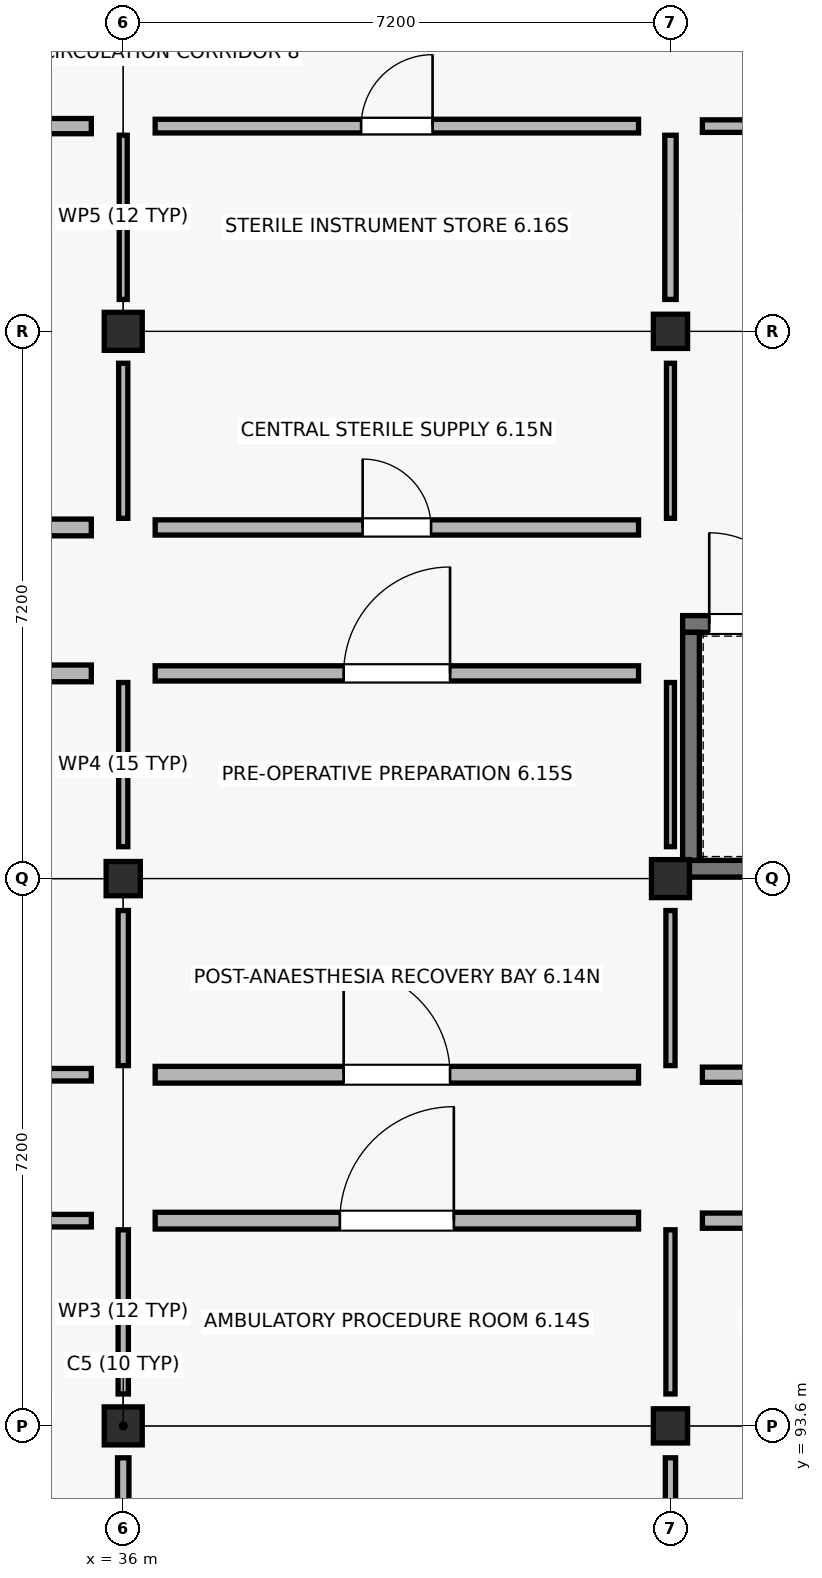
"""IFC4 building model, lengths in metres.
Left out: names, types, materials, properties, quantities, classifications, styles, units other than length and angle.
Written with IfcOpenShell. Run it as: python <this file> out.ifc"""

import sys

from ifc_helpers import new_model, si_unit, direction, frame, frame_2d, origin, origin_2d, place, context, subcontext, project, spatial, rectangle, extrude, element, fill, save


model = new_model("IFC4")
c1 = context("Model", 3, precision=1e-05, world=origin(), true_north=direction((0.0, 1.0)))
c2 = subcontext(c1, "Body", "Model", "MODEL_VIEW")
j1 = project(units=[si_unit("LENGTHUNIT", "METRE"), si_unit("PLANEANGLEUNIT", "RADIAN")], contexts=[c1])
p1 = place(None, origin())
s1 = spatial("IfcSite", under=j1, at=p1, CompositionType="ELEMENT")
p2 = place(p1, origin())
s2 = spatial("IfcBuilding", under=s1, at=p2, CompositionType="ELEMENT")
p3 = place(p2, frame((0.0, 0.0, 9.0)))
s3 = spatial("IfcBuildingStorey", under=s2, at=p3, CompositionType="ELEMENT", Elevation=9.0)
p4 = place(p3, frame((36.0, 93.6, 0.0), z_axis=(0.0, 0.0, 1.0), x_axis=(1.0, 0.0, 0.0)))
e1 = element("IfcColumn", 1, at=p4, inside=s3, PredefinedType="COLUMN", context=c2, shape_type="SweptSolid", body=[
    extrude(rectangle(XDim=0.5, YDim=0.5, at=origin_2d()), origin(), (0.0, 0.0, 1.0), 4.28),
])
p5 = place(p3, frame((36.0, 100.8, 0.0), z_axis=(0.0, 0.0, 1.0), x_axis=(1.0, 0.0, 0.0)))
e2 = element("IfcColumn", 2, at=p5, inside=s3, PredefinedType="COLUMN", context=c2, shape_type="SweptSolid", body=[
    extrude(rectangle(XDim=0.45, YDim=0.45, at=origin_2d()), origin(), (0.0, 0.0, 1.0), 4.28),
])
p6 = place(p3, frame((36.0, 108.0, 0.0), z_axis=(0.0, 0.0, 1.0), x_axis=(1.0, 0.0, 0.0)))
e3 = element("IfcColumn", 3, at=p6, inside=s3, PredefinedType="COLUMN", context=c2, shape_type="SweptSolid", body=[
    extrude(rectangle(XDim=0.5, YDim=0.5, at=origin_2d()), origin(), (0.0, 0.0, 1.0), 4.28),
])
p7 = place(p3, frame((43.2, 93.6, 0.0), z_axis=(0.0, 0.0, 1.0), x_axis=(1.0, 0.0, 0.0)))
e4 = element("IfcColumn", 4, at=p7, inside=s3, PredefinedType="COLUMN", context=c2, shape_type="SweptSolid", body=[
    extrude(rectangle(XDim=0.45, YDim=0.45, at=origin_2d()), origin(), (0.0, 0.0, 1.0), 4.28),
])
p8 = place(p3, frame((43.2, 100.8, 0.0), z_axis=(0.0, 0.0, 1.0), x_axis=(1.0, 0.0, 0.0)))
e5 = element("IfcColumn", 5, at=p8, inside=s3, PredefinedType="COLUMN", context=c2, shape_type="SweptSolid", body=[
    extrude(rectangle(XDim=0.5, YDim=0.5, at=origin_2d()), origin(), (0.0, 0.0, 1.0), 4.28),
])
p9 = place(p3, frame((43.2, 108.0, 0.0), z_axis=(0.0, 0.0, 1.0), x_axis=(1.0, 0.0, 0.0)))
e6 = element("IfcColumn", 6, at=p9, inside=s3, PredefinedType="COLUMN", context=c2, shape_type="SweptSolid", body=[
    extrude(rectangle(XDim=0.45, YDim=0.45, at=origin_2d()), origin(), (0.0, 0.0, 1.0), 4.28),
])
p10 = place(p3, frame((43.36, 100.93, 0.0), z_axis=(0.0, 0.0, 1.0), x_axis=(1.0, 0.0, 0.0)))
e7 = element("IfcWall", 7, at=p10, inside=s3, PredefinedType="SHEAR", context=c2, shape_type="SweptSolid", body=[
    extrude(rectangle(XDim=6.88, YDim=0.22, at=frame_2d((3.44, 0.0))), origin(), (0.0, 0.0, 1.0), 4.24),
])
p11 = place(p3, frame((43.36, 104.15, 0.0), z_axis=(0.0, 0.0, 1.0), x_axis=(1.0, 0.0, 0.0)))
e8 = element("IfcWall", 8, at=p11, inside=s3, PredefinedType="SHEAR", context=c2, shape_type="SweptSolid", body=[
    extrude(rectangle(XDim=6.88, YDim=0.22, at=frame_2d((3.44, 0.0))), origin(), (0.0, 0.0, 1.0), 4.24),
])
p12 = place(p11, frame((0.35, 0.0, 0.0)))
e9 = element("IfcOpeningElement", 9, at=p12, cuts=e8, PredefinedType="OPENING", context=c2, shape_type="SweptSolid", body=[
    extrude(rectangle(XDim=1.2, YDim=2.15, at=frame_2d((0.6, 1.075))), frame((0.0, 0.12, 0.0), z_axis=(0.0, -1.0, 0.0), x_axis=(1.0, 0.0, 0.0)), (0.0, 0.0, 1.0), 0.24),
])
p13 = place(p3, frame((43.47, 101.04, 0.0), z_axis=(0.0, 0.0, 1.0), x_axis=(0.0, 1.0, 0.0)))
e10 = element("IfcWall", 10, at=p13, inside=s3, PredefinedType="SHEAR", context=c2, shape_type="SweptSolid", body=[
    extrude(rectangle(XDim=3.0, YDim=0.22, at=frame_2d((1.5, 0.0))), origin(), (0.0, 0.0, 1.0), 4.24),
])
p14 = place(p3, frame((36.0, 91.14, 0.0), z_axis=(0.0, 0.0, 1.0), x_axis=(0.0, 1.0, 0.0)))
e11 = element("IfcWall", 11, at=p14, inside=s3, PredefinedType="PARTITIONING", context=c2, shape_type="SweptSolid", body=[
    extrude(rectangle(XDim=2.04, YDim=0.15, at=frame_2d((1.02, 0.0))), origin(), (0.0, 0.0, 1.0), 3.38),
])
p15 = place(p3, frame((29.22, 96.3, 0.0), z_axis=(0.0, 0.0, 1.0), x_axis=(1.0, 0.0, 0.0)))
e12 = element("IfcWall", 12, at=p15, inside=s3, PredefinedType="PARTITIONING", context=c2, shape_type="SweptSolid", body=[
    extrude(rectangle(XDim=6.36, YDim=0.165, at=frame_2d((3.18, 0.0))), origin(), (0.0, 0.0, 1.0), 3.38),
])
p16 = place(p15, frame((2.48, 0.0, 0.0)))
e13 = element("IfcOpeningElement", 13, at=p16, cuts=e12, PredefinedType="OPENING", context=c2, shape_type="SweptSolid", body=[
    extrude(rectangle(XDim=1.4, YDim=2.2, at=frame_2d((0.7, 1.1))), frame((0.0, 0.093, 0.0), z_axis=(0.0, -1.0, 0.0), x_axis=(1.0, 0.0, 0.0)), (0.0, 0.0, 1.0), 0.185),
])
p17 = place(p3, frame((36.0, 94.02, 0.0), z_axis=(0.0, 0.0, 1.0), x_axis=(0.0, 1.0, 0.0)))
e14 = element("IfcWall", 14, at=p17, inside=s3, PredefinedType="PARTITIONING", context=c2, shape_type="SweptSolid", body=[
    extrude(rectangle(XDim=2.16, YDim=0.135, at=frame_2d((1.08, 0.0))), origin(), (0.0, 0.0, 1.0), 3.38),
])
p18 = place(p3, frame((29.22, 98.22, 0.0), z_axis=(0.0, 0.0, 1.0), x_axis=(1.0, 0.0, 0.0)))
e15 = element("IfcWall", 15, at=p18, inside=s3, PredefinedType="PARTITIONING", context=c2, shape_type="SweptSolid", body=[
    extrude(rectangle(XDim=6.36, YDim=0.165, at=frame_2d((3.18, 0.0))), origin(), (0.0, 0.0, 1.0), 3.38),
])
p19 = place(p18, frame((2.48, 0.0, 0.0)))
e16 = element("IfcOpeningElement", 16, at=p19, cuts=e15, PredefinedType="OPENING", context=c2, shape_type="SweptSolid", body=[
    extrude(rectangle(XDim=1.4, YDim=2.2, at=frame_2d((0.7, 1.1))), frame((0.0, 0.093, 0.0), z_axis=(0.0, -1.0, 0.0), x_axis=(1.0, 0.0, 0.0)), (0.0, 0.0, 1.0), 0.185),
])
p20 = place(p3, frame((36.0, 98.34, 0.0), z_axis=(0.0, 0.0, 1.0), x_axis=(0.0, 1.0, 0.0)))
e17 = element("IfcWall", 17, at=p20, inside=s3, PredefinedType="PARTITIONING", context=c2, shape_type="SweptSolid", body=[
    extrude(rectangle(XDim=2.04, YDim=0.135, at=frame_2d((1.02, 0.0))), origin(), (0.0, 0.0, 1.0), 3.38),
])
p21 = place(p3, frame((29.22, 103.5, 0.0), z_axis=(0.0, 0.0, 1.0), x_axis=(1.0, 0.0, 0.0)))
e18 = element("IfcWall", 18, at=p21, inside=s3, PredefinedType="SOLIDWALL", context=c2, shape_type="SweptSolid", body=[
    extrude(rectangle(XDim=6.36, YDim=0.22, at=frame_2d((3.18, 0.0))), origin(), (0.0, 0.0, 1.0), 3.38),
])
p22 = place(p21, frame((2.59, 0.0, 0.0)))
e19 = element("IfcOpeningElement", 19, at=p22, cuts=e18, PredefinedType="OPENING", context=c2, shape_type="SweptSolid", body=[
    extrude(rectangle(XDim=1.18, YDim=2.14, at=frame_2d((0.59, 1.07))), frame((0.0, 0.12, 0.0), z_axis=(0.0, -1.0, 0.0), x_axis=(1.0, 0.0, 0.0)), (0.0, 0.0, 1.0), 0.24),
])
p23 = place(p3, frame((36.0, 101.22, 0.0), z_axis=(0.0, 0.0, 1.0), x_axis=(0.0, 1.0, 0.0)))
e20 = element("IfcWall", 20, at=p23, inside=s3, PredefinedType="PARTITIONING", context=c2, shape_type="SweptSolid", body=[
    extrude(rectangle(XDim=2.16, YDim=0.12, at=frame_2d((1.08, 0.0))), origin(), (0.0, 0.0, 1.0), 3.38),
])
p24 = place(p3, frame((29.22, 105.42, 0.0), z_axis=(0.0, 0.0, 1.0), x_axis=(1.0, 0.0, 0.0)))
e21 = element("IfcWall", 21, at=p24, inside=s3, PredefinedType="SOLIDWALL", context=c2, shape_type="SweptSolid", body=[
    extrude(rectangle(XDim=6.36, YDim=0.22, at=frame_2d((3.18, 0.0))), origin(), (0.0, 0.0, 1.0), 3.38),
])
p25 = place(p24, frame((2.57, 0.0, 0.0)))
e22 = element("IfcOpeningElement", 22, at=p25, cuts=e21, PredefinedType="OPENING", context=c2, shape_type="SweptSolid", body=[
    extrude(rectangle(XDim=1.22, YDim=2.14, at=frame_2d((0.61, 1.07))), frame((0.0, 0.12, 0.0), z_axis=(0.0, -1.0, 0.0), x_axis=(1.0, 0.0, 0.0)), (0.0, 0.0, 1.0), 0.24),
])
p26 = place(p3, frame((36.0, 105.54, 0.0), z_axis=(0.0, 0.0, 1.0), x_axis=(0.0, 1.0, 0.0)))
e23 = element("IfcWall", 23, at=p26, inside=s3, PredefinedType="PARTITIONING", context=c2, shape_type="SweptSolid", body=[
    extrude(rectangle(XDim=2.04, YDim=0.12, at=frame_2d((1.02, 0.0))), origin(), (0.0, 0.0, 1.0), 3.38),
])
p27 = place(p3, frame((29.22, 110.7, 0.0), z_axis=(0.0, 0.0, 1.0), x_axis=(1.0, 0.0, 0.0)))
e24 = element("IfcWall", 24, at=p27, inside=s3, PredefinedType="SOLIDWALL", context=c2, shape_type="SweptSolid", body=[
    extrude(rectangle(XDim=6.36, YDim=0.2, at=frame_2d((3.18, 0.0))), origin(), (0.0, 0.0, 1.0), 3.38),
])
p28 = place(p27, frame((2.43, 0.0, 0.0)))
e25 = element("IfcOpeningElement", 25, at=p28, cuts=e24, PredefinedType="OPENING", context=c2, shape_type="SweptSolid", body=[
    extrude(rectangle(XDim=1.5, YDim=2.2, at=frame_2d((0.75, 1.1))), frame((0.0, 0.11, 0.0), z_axis=(0.0, -1.0, 0.0), x_axis=(1.0, 0.0, 0.0)), (0.0, 0.0, 1.0), 0.22),
])
p29 = place(p3, frame((36.0, 108.42, 0.0), z_axis=(0.0, 0.0, 1.0), x_axis=(0.0, 1.0, 0.0)))
e26 = element("IfcWall", 26, at=p29, inside=s3, PredefinedType="PARTITIONING", context=c2, shape_type="SweptSolid", body=[
    extrude(rectangle(XDim=2.16, YDim=0.105, at=frame_2d((1.08, 0.0))), origin(), (0.0, 0.0, 1.0), 3.38),
])
p30 = place(p3, frame((43.2, 91.14, 0.0), z_axis=(0.0, 0.0, 1.0), x_axis=(0.0, 1.0, 0.0)))
e27 = element("IfcWall", 27, at=p30, inside=s3, PredefinedType="PARTITIONING", context=c2, shape_type="SweptSolid", body=[
    extrude(rectangle(XDim=2.04, YDim=0.135, at=frame_2d((1.02, 0.0))), origin(), (0.0, 0.0, 1.0), 3.38),
])
p31 = place(p3, frame((36.42, 96.3, 0.0), z_axis=(0.0, 0.0, 1.0), x_axis=(1.0, 0.0, 0.0)))
e28 = element("IfcWall", 28, at=p31, inside=s3, PredefinedType="SOLIDWALL", context=c2, shape_type="SweptSolid", body=[
    extrude(rectangle(XDim=6.36, YDim=0.22, at=frame_2d((3.18, 0.0))), origin(), (0.0, 0.0, 1.0), 3.38),
])
p32 = place(p31, frame((2.43, 0.0, 0.0)))
e29 = element("IfcOpeningElement", 29, at=p32, cuts=e28, PredefinedType="OPENING", context=c2, shape_type="SweptSolid", body=[
    extrude(rectangle(XDim=1.5, YDim=2.2, at=frame_2d((0.75, 1.1))), frame((0.0, 0.12, 0.0), z_axis=(0.0, -1.0, 0.0), x_axis=(1.0, 0.0, 0.0)), (0.0, 0.0, 1.0), 0.24),
])
p33 = place(p3, frame((43.2, 94.02, 0.0), z_axis=(0.0, 0.0, 1.0), x_axis=(0.0, 1.0, 0.0)))
e30 = element("IfcWall", 30, at=p33, inside=s3, PredefinedType="PARTITIONING", context=c2, shape_type="SweptSolid", body=[
    extrude(rectangle(XDim=2.16, YDim=0.12, at=frame_2d((1.08, 0.0))), origin(), (0.0, 0.0, 1.0), 3.38),
])
p34 = place(p3, frame((36.42, 98.22, 0.0), z_axis=(0.0, 0.0, 1.0), x_axis=(1.0, 0.0, 0.0)))
e31 = element("IfcWall", 31, at=p34, inside=s3, PredefinedType="SOLIDWALL", context=c2, shape_type="SweptSolid", body=[
    extrude(rectangle(XDim=6.36, YDim=0.22, at=frame_2d((3.18, 0.0))), origin(), (0.0, 0.0, 1.0), 3.38),
])
p35 = place(p34, frame((2.48, 0.0, 0.0)))
e32 = element("IfcOpeningElement", 32, at=p35, cuts=e31, PredefinedType="OPENING", context=c2, shape_type="SweptSolid", body=[
    extrude(rectangle(XDim=1.4, YDim=2.2, at=frame_2d((0.7, 1.1))), frame((0.0, 0.12, 0.0), z_axis=(0.0, -1.0, 0.0), x_axis=(1.0, 0.0, 0.0)), (0.0, 0.0, 1.0), 0.24),
])
p36 = place(p3, frame((43.2, 98.34, 0.0), z_axis=(0.0, 0.0, 1.0), x_axis=(0.0, 1.0, 0.0)))
e33 = element("IfcWall", 33, at=p36, inside=s3, PredefinedType="PARTITIONING", context=c2, shape_type="SweptSolid", body=[
    extrude(rectangle(XDim=2.04, YDim=0.12, at=frame_2d((1.02, 0.0))), origin(), (0.0, 0.0, 1.0), 3.38),
])
p37 = place(p3, frame((36.42, 103.5, 0.0), z_axis=(0.0, 0.0, 1.0), x_axis=(1.0, 0.0, 0.0)))
e34 = element("IfcWall", 34, at=p37, inside=s3, PredefinedType="SOLIDWALL", context=c2, shape_type="SweptSolid", body=[
    extrude(rectangle(XDim=6.36, YDim=0.2, at=frame_2d((3.18, 0.0))), origin(), (0.0, 0.0, 1.0), 3.38),
])
p38 = place(p37, frame((2.48, 0.0, 0.0)))
e35 = element("IfcOpeningElement", 35, at=p38, cuts=e34, PredefinedType="OPENING", context=c2, shape_type="SweptSolid", body=[
    extrude(rectangle(XDim=1.4, YDim=2.2, at=frame_2d((0.7, 1.1))), frame((0.0, 0.11, 0.0), z_axis=(0.0, -1.0, 0.0), x_axis=(1.0, 0.0, 0.0)), (0.0, 0.0, 1.0), 0.22),
])
p39 = place(p3, frame((43.2, 101.22, 0.0), z_axis=(0.0, 0.0, 1.0), x_axis=(0.0, 1.0, 0.0)))
e36 = element("IfcWall", 36, at=p39, inside=s3, PredefinedType="PARTITIONING", context=c2, shape_type="SweptSolid", body=[
    extrude(rectangle(XDim=2.16, YDim=0.105, at=frame_2d((1.08, 0.0))), origin(), (0.0, 0.0, 1.0), 3.38),
])
p40 = place(p3, frame((36.42, 105.42, 0.0), z_axis=(0.0, 0.0, 1.0), x_axis=(1.0, 0.0, 0.0)))
e37 = element("IfcWall", 37, at=p40, inside=s3, PredefinedType="SOLIDWALL", context=c2, shape_type="SweptSolid", body=[
    extrude(rectangle(XDim=6.36, YDim=0.2, at=frame_2d((3.18, 0.0))), origin(), (0.0, 0.0, 1.0), 3.38),
])
p41 = place(p40, frame((2.73, 0.0, 0.0)))
e38 = element("IfcOpeningElement", 38, at=p41, cuts=e37, PredefinedType="OPENING", context=c2, shape_type="SweptSolid", body=[
    extrude(rectangle(XDim=0.9, YDim=2.19, at=frame_2d((0.45, 1.095))), frame((0.0, 0.11, 0.0), z_axis=(0.0, -1.0, 0.0), x_axis=(1.0, 0.0, 0.0)), (0.0, 0.0, 1.0), 0.22),
])
p42 = place(p3, frame((43.2, 105.54, 0.0), z_axis=(0.0, 0.0, 1.0), x_axis=(0.0, 1.0, 0.0)))
e39 = element("IfcWall", 39, at=p42, inside=s3, PredefinedType="PARTITIONING", context=c2, shape_type="SweptSolid", body=[
    extrude(rectangle(XDim=2.04, YDim=0.105, at=frame_2d((1.02, 0.0))), origin(), (0.0, 0.0, 1.0), 3.38),
])
p43 = place(p3, frame((36.42, 110.7, 0.0), z_axis=(0.0, 0.0, 1.0), x_axis=(1.0, 0.0, 0.0)))
e40 = element("IfcWall", 40, at=p43, inside=s3, PredefinedType="PARTITIONING", context=c2, shape_type="SweptSolid", body=[
    extrude(rectangle(XDim=6.36, YDim=0.18, at=frame_2d((3.18, 0.0))), origin(), (0.0, 0.0, 1.0), 3.38),
])
p44 = place(p43, frame((2.71, 0.0, 0.0)))
e41 = element("IfcOpeningElement", 41, at=p44, cuts=e40, PredefinedType="OPENING", context=c2, shape_type="SweptSolid", body=[
    extrude(rectangle(XDim=0.94, YDim=2.19, at=frame_2d((0.47, 1.095))), frame((0.0, 0.1, 0.0), z_axis=(0.0, -1.0, 0.0), x_axis=(1.0, 0.0, 0.0)), (0.0, 0.0, 1.0), 0.2),
])
p45 = place(p3, frame((43.2, 108.42, 0.0), z_axis=(0.0, 0.0, 1.0), x_axis=(0.0, 1.0, 0.0)))
e42 = element("IfcWall", 42, at=p45, inside=s3, PredefinedType="PARTITIONING", context=c2, shape_type="SweptSolid", body=[
    extrude(rectangle(XDim=2.16, YDim=0.15, at=frame_2d((1.08, 0.0))), origin(), (0.0, 0.0, 1.0), 3.38),
])
p46 = place(p3, frame((43.62, 96.3, 0.0), z_axis=(0.0, 0.0, 1.0), x_axis=(1.0, 0.0, 0.0)))
e43 = element("IfcWall", 43, at=p46, inside=s3, PredefinedType="SOLIDWALL", context=c2, shape_type="SweptSolid", body=[
    extrude(rectangle(XDim=6.36, YDim=0.2, at=frame_2d((3.18, 0.0))), origin(), (0.0, 0.0, 1.0), 3.38),
])
p47 = place(p46, frame((2.43, 0.0, 0.0)))
e44 = element("IfcOpeningElement", 44, at=p47, cuts=e43, PredefinedType="OPENING", context=c2, shape_type="SweptSolid", body=[
    extrude(rectangle(XDim=1.5, YDim=2.2, at=frame_2d((0.75, 1.1))), frame((0.0, 0.11, 0.0), z_axis=(0.0, -1.0, 0.0), x_axis=(1.0, 0.0, 0.0)), (0.0, 0.0, 1.0), 0.22),
])
p48 = place(p3, frame((43.62, 98.22, 0.0), z_axis=(0.0, 0.0, 1.0), x_axis=(1.0, 0.0, 0.0)))
e45 = element("IfcWall", 45, at=p48, inside=s3, PredefinedType="SOLIDWALL", context=c2, shape_type="SweptSolid", body=[
    extrude(rectangle(XDim=6.36, YDim=0.2, at=frame_2d((3.18, 0.0))), origin(), (0.0, 0.0, 1.0), 3.38),
])
p49 = place(p48, frame((2.43, 0.0, 0.0)))
e46 = element("IfcOpeningElement", 46, at=p49, cuts=e45, PredefinedType="OPENING", context=c2, shape_type="SweptSolid", body=[
    extrude(rectangle(XDim=1.5, YDim=2.2, at=frame_2d((0.75, 1.1))), frame((0.0, 0.11, 0.0), z_axis=(0.0, -1.0, 0.0), x_axis=(1.0, 0.0, 0.0)), (0.0, 0.0, 1.0), 0.22),
])
p50 = place(p3, frame((43.62, 110.7, 0.0), z_axis=(0.0, 0.0, 1.0), x_axis=(1.0, 0.0, 0.0)))
e47 = element("IfcWall", 47, at=p50, inside=s3, PredefinedType="PARTITIONING", context=c2, shape_type="SweptSolid", body=[
    extrude(rectangle(XDim=6.36, YDim=0.165, at=frame_2d((3.18, 0.0))), origin(), (0.0, 0.0, 1.0), 3.38),
])
p51 = place(p50, frame((2.48, 0.0, 0.0)))
e48 = element("IfcOpeningElement", 48, at=p51, cuts=e47, PredefinedType="OPENING", context=c2, shape_type="SweptSolid", body=[
    extrude(rectangle(XDim=1.4, YDim=2.2, at=frame_2d((0.7, 1.1))), frame((0.0, 0.093, 0.0), z_axis=(0.0, -1.0, 0.0), x_axis=(1.0, 0.0, 0.0)), (0.0, 0.0, 1.0), 0.185),
])
p52 = place(p12, origin())
e49 = element("IfcDoor", 49, at=p52, inside=s3, OperationType="SINGLE_SWING_LEFT", PredefinedType="DOOR", context=c2, shape_type="SweptSolid", body=[
    extrude(rectangle(XDim=1.2, YDim=2.15, at=frame_2d((0.6, 1.075))), frame((0.0, 0.025, 0.0), z_axis=(0.0, -1.0, 0.0), x_axis=(1.0, 0.0, 0.0)), (0.0, 0.0, 1.0), 0.05),
])
fill(e9, e49)
p53 = place(p32, origin())
e50 = element("IfcDoor", 50, at=p53, inside=s3, OperationType="SINGLE_SWING_RIGHT", PredefinedType="DOOR", context=c2, shape_type="SweptSolid", body=[
    extrude(rectangle(XDim=1.5, YDim=2.2, at=frame_2d((0.75, 1.1))), frame((0.0, 0.025, 0.0), z_axis=(0.0, -1.0, 0.0), x_axis=(1.0, 0.0, 0.0)), (0.0, 0.0, 1.0), 0.05),
])
fill(e29, e50)
p54 = place(p35, origin())
e51 = element("IfcDoor", 51, at=p54, inside=s3, OperationType="SINGLE_SWING_LEFT", PredefinedType="DOOR", context=c2, shape_type="SweptSolid", body=[
    extrude(rectangle(XDim=1.4, YDim=2.2, at=frame_2d((0.7, 1.1))), frame((0.0, 0.025, 0.0), z_axis=(0.0, -1.0, 0.0), x_axis=(1.0, 0.0, 0.0)), (0.0, 0.0, 1.0), 0.05),
])
fill(e32, e51)
p55 = place(p38, origin())
e52 = element("IfcDoor", 52, at=p55, inside=s3, OperationType="SINGLE_SWING_RIGHT", PredefinedType="DOOR", context=c2, shape_type="SweptSolid", body=[
    extrude(rectangle(XDim=1.4, YDim=2.2, at=frame_2d((0.7, 1.1))), frame((0.0, 0.025, 0.0), z_axis=(0.0, -1.0, 0.0), x_axis=(1.0, 0.0, 0.0)), (0.0, 0.0, 1.0), 0.05),
])
fill(e35, e52)
p56 = place(p41, origin())
e53 = element("IfcDoor", 53, at=p56, inside=s3, OperationType="SINGLE_SWING_LEFT", PredefinedType="DOOR", context=c2, shape_type="SweptSolid", body=[
    extrude(rectangle(XDim=0.9, YDim=2.19, at=frame_2d((0.45, 1.095))), frame((0.0, 0.025, 0.0), z_axis=(0.0, -1.0, 0.0), x_axis=(1.0, 0.0, 0.0)), (0.0, 0.0, 1.0), 0.05),
])
fill(e38, e53)
p57 = place(p44, origin())
e54 = element("IfcDoor", 54, at=p57, inside=s3, OperationType="SINGLE_SWING_RIGHT", PredefinedType="DOOR", context=c2, shape_type="SweptSolid", body=[
    extrude(rectangle(XDim=0.94, YDim=2.19, at=frame_2d((0.47, 1.095))), frame((0.0, 0.025, 0.0), z_axis=(0.0, -1.0, 0.0), x_axis=(1.0, 0.0, 0.0)), (0.0, 0.0, 1.0), 0.05),
])
fill(e41, e54)
save(model, sys.argv[1])
